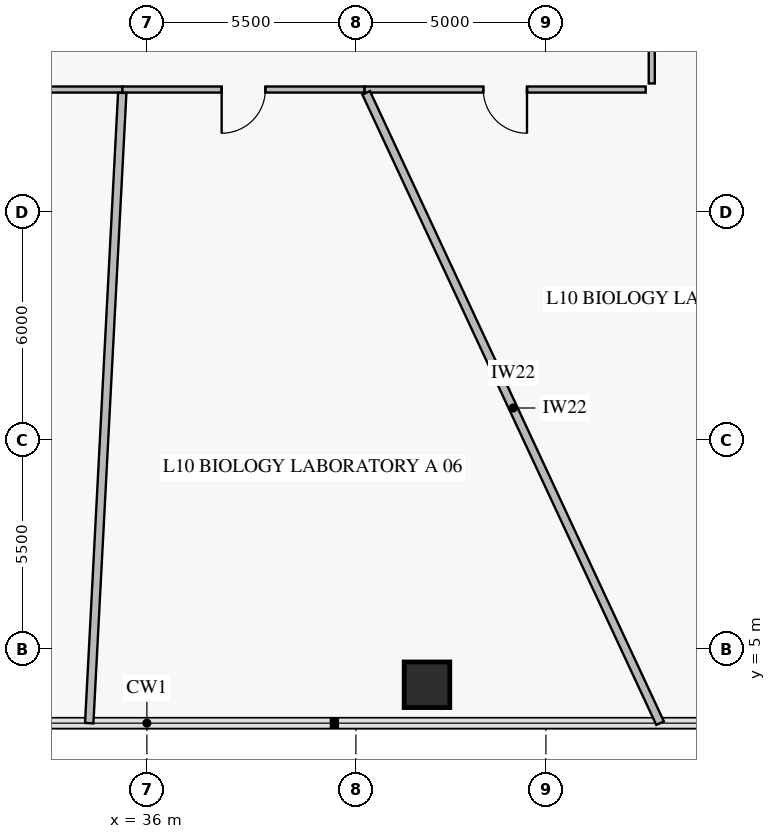
"""IFC4 building model, lengths in metres.
Left out: names, types, materials, properties, quantities, classifications, styles, units other than length and angle.
Written with IfcOpenShell. Run it as: python <this file> out.ifc"""

import sys

from ifc_helpers import new_model, si_unit, direction, frame, frame_2d, origin, origin_2d, place, context, subcontext, project, spatial, rectangle, extrude, element, fill, save


model = new_model("IFC4")
c1 = context("Model", 3, precision=1e-05, world=origin(), true_north=direction((0.0, 1.0)))
c2 = subcontext(c1, "Body", "Model", "MODEL_VIEW")
j1 = project(units=[si_unit("LENGTHUNIT", "METRE"), si_unit("PLANEANGLEUNIT", "RADIAN")], contexts=[c1])
p1 = place(None, origin())
s1 = spatial("IfcSite", under=j1, at=p1, CompositionType="ELEMENT")
p2 = place(p1, origin())
s2 = spatial("IfcBuilding", under=s1, at=p2, CompositionType="ELEMENT")
p3 = place(p2, frame((0.0, 0.0, 41.4)))
s3 = spatial("IfcBuildingStorey", under=s2, at=p3, CompositionType="ELEMENT", Elevation=41.4)
p4 = place(p3, frame((43.37, 4.052, 0.0), z_axis=(0.0, 0.0, 1.0), x_axis=(1.0, 0.0, 0.0)))
e1 = element("IfcColumn", 1, at=p4, inside=s3, PredefinedType="COLUMN", context=c2, shape_type="SweptSolid", body=[
    extrude(rectangle(XDim=1.2, YDim=1.2, at=origin_2d()), origin(), (0.0, 0.0, 1.0), 3.92),
])
p5 = place(p3, frame((27.714, 19.715, 0.0), z_axis=(0.0, 0.0, 1.0), x_axis=(1.0, 0.0, 0.0)))
e2 = element("IfcWall", 2, at=p5, inside=s3, PredefinedType="PARTITIONING", context=c2, shape_type="SweptSolid", body=[
    extrude(rectangle(XDim=7.643, YDim=0.16, at=frame_2d((3.821, 0.0))), origin(), (0.0, 0.0, 1.0), 3.22),
])
p6 = place(p5, frame((3.246, 0.0, 0.0)))
e3 = element("IfcOpeningElement", 3, at=p6, cuts=e2, PredefinedType="OPENING", context=c2, shape_type="SweptSolid", body=[
    extrude(rectangle(XDim=1.15, YDim=2.2, at=frame_2d((0.575, 1.1))), frame((0.0, 0.092, 0.0), z_axis=(0.0, -1.0, 0.0), x_axis=(1.0, 0.0, 0.0)), (0.0, 0.0, 1.0), 0.184),
])
p7 = place(p3, frame((35.356, 19.715, 0.0), z_axis=(0.0, 0.0, 1.0), x_axis=(1.0, 0.0, 0.0)))
e4 = element("IfcWall", 4, at=p7, inside=s3, PredefinedType="PARTITIONING", context=c2, shape_type="SweptSolid", body=[
    extrude(rectangle(XDim=6.372, YDim=0.16, at=frame_2d((3.186, 0.0))), origin(), (0.0, 0.0, 1.0), 3.22),
])
p8 = place(p7, frame((2.611, 0.0, 0.0)))
e5 = element("IfcOpeningElement", 5, at=p8, cuts=e4, PredefinedType="OPENING", context=c2, shape_type="SweptSolid", body=[
    extrude(rectangle(XDim=1.15, YDim=2.2, at=frame_2d((0.575, 1.1))), frame((0.0, 0.092, 0.0), z_axis=(0.0, -1.0, 0.0), x_axis=(1.0, 0.0, 0.0)), (0.0, 0.0, 1.0), 0.184),
])
p9 = place(p3, frame((41.729, 19.715, 0.0), z_axis=(0.0, 0.0, 1.0), x_axis=(1.0, 0.0, 0.0)))
e6 = element("IfcWall", 6, at=p9, inside=s3, PredefinedType="PARTITIONING", context=c2, shape_type="SweptSolid", body=[
    extrude(rectangle(XDim=7.396, YDim=0.16, at=frame_2d((3.698, 0.0))), origin(), (0.0, 0.0, 1.0), 3.22),
])
p10 = place(p9, frame((3.123, 0.0, 0.0)))
e7 = element("IfcOpeningElement", 7, at=p10, cuts=e6, PredefinedType="OPENING", context=c2, shape_type="SweptSolid", body=[
    extrude(rectangle(XDim=1.15, YDim=2.2, at=frame_2d((0.575, 1.1))), frame((0.0, 0.092, 0.0), z_axis=(0.0, -1.0, 0.0), x_axis=(1.0, 0.0, 0.0)), (0.0, 0.0, 1.0), 0.184),
])
p11 = place(p3, frame((35.352, 19.627, 0.0), z_axis=(0.0, 0.0, 1.0), x_axis=(-0.052331996973, -0.998629742243, 0.0)))
e8 = element("IfcWall", 8, at=p11, inside=s3, PredefinedType="PARTITIONING", context=c2, shape_type="SweptSolid", body=[
    extrude(rectangle(XDim=16.608, YDim=0.22, at=frame_2d((8.304, 0.0))), origin(), (0.0, 0.0, 1.0), 3.17),
])
p12 = place(p3, frame((41.77, 19.627, 0.0), z_axis=(0.0, 0.0, 1.0), x_axis=(0.422616678834, -0.906308525156, 0.0)))
e9 = element("IfcWall", 9, at=p12, inside=s3, PredefinedType="PARTITIONING", context=c2, shape_type="SweptSolid", body=[
    extrude(rectangle(XDim=18.3, YDim=0.22, at=frame_2d((9.15, 0.0))), origin(), (0.0, 0.0, 1.0), 3.17),
])
p13 = place(p3, frame((49.285, 19.875, 0.0), z_axis=(0.0, 0.0, 1.0), x_axis=(0.0, 1.0, 0.0)))
e10 = element("IfcWall", 10, at=p13, inside=s3, PredefinedType="PARTITIONING", context=c2, shape_type="SweptSolid", body=[
    extrude(rectangle(XDim=2.114, YDim=0.16, at=frame_2d((1.057, 0.0))), origin(), (0.0, 0.0, 1.0), 3.92),
])
p14 = place(p3, frame((49.373, 21.923, 0.0), z_axis=(0.0, 0.0, 1.0), x_axis=(0.798630996951, -0.601821012187, 0.0)))
e11 = element("IfcWall", 11, at=p14, inside=s3, PredefinedType="PARTITIONING", context=c2, shape_type="SweptSolid", body=[
    extrude(rectangle(XDim=12.431, YDim=0.22, at=frame_2d((6.215, 0.0))), origin(), (0.0, 0.0, 1.0), 3.17),
])
p15 = place(p8, frame((1.15, 0.0, 0.0), z_axis=(0.0, 0.0, 1.0), x_axis=(-1.0, 0.0, 0.0)))
e12 = element("IfcDoor", 12, at=p15, inside=s3, OperationType="SINGLE_SWING_RIGHT", PredefinedType="DOOR", context=c2, shape_type="SweptSolid", body=[
    extrude(rectangle(XDim=1.15, YDim=2.2, at=frame_2d((0.575, 1.1))), frame((0.0, 0.025, 0.0), z_axis=(0.0, -1.0, 0.0), x_axis=(1.0, 0.0, 0.0)), (0.0, 0.0, 1.0), 0.05),
])
fill(e5, e12)
p16 = place(p10, frame((1.15, 0.0, 0.0), z_axis=(0.0, 0.0, 1.0), x_axis=(-1.0, 0.0, 0.0)))
e13 = element("IfcDoor", 13, at=p16, inside=s3, OperationType="SINGLE_SWING_LEFT", PredefinedType="DOOR", context=c2, shape_type="SweptSolid", body=[
    extrude(rectangle(XDim=1.15, YDim=2.2, at=frame_2d((0.575, 1.1))), frame((0.0, 0.025, 0.0), z_axis=(0.0, -1.0, 0.0), x_axis=(1.0, 0.0, 0.0)), (0.0, 0.0, 1.0), 0.05),
])
fill(e7, e13)
save(model, sys.argv[1])
